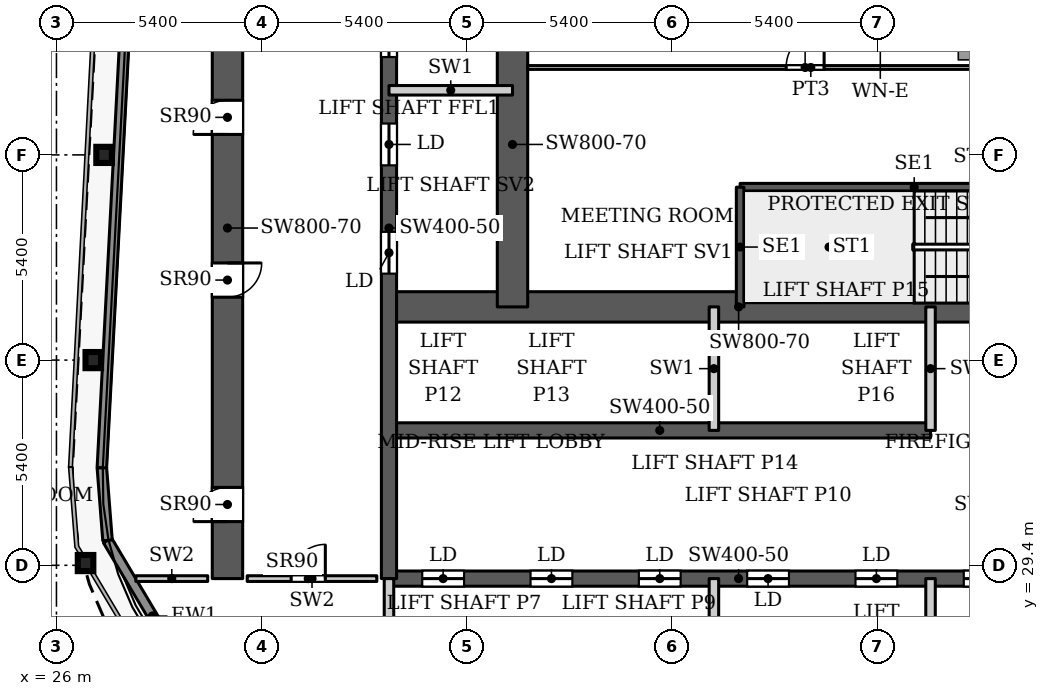
"""IFC4 building model, lengths in metres.
Left out: names, types, materials, properties, quantities, classifications, styles, units other than length and angle.
Written with IfcOpenShell. Run it as: python <this file> out.ifc"""

import sys

from ifc_helpers import new_model, si_unit, direction, frame, frame_2d, origin, origin_2d, place, context, subcontext, project, spatial, rectangle, i_section, extrude, source, transform, mapped, element, fill, save


model = new_model("IFC4")
c1 = context("Model", 3, precision=1e-05, world=origin(), true_north=direction((0.0, 1.0)))
c2 = subcontext(c1, "Body", "Model", "MODEL_VIEW")
j1 = project(units=[si_unit("LENGTHUNIT", "METRE"), si_unit("PLANEANGLEUNIT", "RADIAN")], contexts=[c1])
p1 = place(None, origin())
s1 = spatial("IfcSite", under=j1, at=p1, CompositionType="ELEMENT")
p2 = place(p1, origin())
s2 = spatial("IfcBuilding", under=s1, at=p2, CompositionType="ELEMENT")
p3 = place(p2, frame((0.0, 0.0, 172.1)))
s3 = spatial("IfcBuildingStorey", under=s2, at=p3, CompositionType="ELEMENT", Elevation=172.1)
for number, where, z_axis, x_axis in (
    (1, (26.766, 29.459, 0.0), (0.0, 0.0, 1.0), (1.0, 0.0, 0.0)),
    (2, (26.969, 34.8, 0.0), (0.0, 0.0, 1.0), (1.0, 0.0, 0.0)),
    (3, (27.253, 40.2, 0.0), (0.0, 0.0, 1.0), (1.0, 0.0, 0.0)),
):
    element("IfcColumn", number, at=place(p3, frame(where, z_axis=z_axis, x_axis=x_axis)), inside=s3, PredefinedType="COLUMN", context=c2, shape_type="SweptSolid", body=[
        extrude(i_section(OverallWidth=0.409, OverallDepth=0.425, WebThickness=0.033, FlangeThickness=0.052, FilletRadius=0.013, at=origin_2d()), origin(), (0.0, 0.0, 1.0), 3.9),
    ])
p4 = place(p3, frame((34.75, 29.05, 0.0), z_axis=(0.0, 0.0, 1.0), x_axis=(1.0, 0.0, 0.0)))
e4 = element("IfcWall", 4, at=p4, inside=s3, PredefinedType="SHEAR", context=c2, shape_type="SweptSolid", body=[
    extrude(rectangle(XDim=18.4, YDim=0.4, at=frame_2d((9.2, 0.0))), origin(), (0.0, 0.0, 1.0), 3.9),
])
p5 = place(p4, frame((0.875, 0.0, 0.0)))
e5 = element("IfcOpeningElement", 5, at=p5, cuts=e4, PredefinedType="OPENING", context=c2, shape_type="SweptSolid", body=[
    extrude(rectangle(XDim=1.1, YDim=2.2, at=frame_2d((0.55, 1.1))), frame((0.0, 0.21, 0.0), z_axis=(0.0, -1.0, 0.0), x_axis=(1.0, 0.0, 0.0)), (0.0, 0.0, 1.0), 0.42),
])
p6 = place(p4, frame((3.725, 0.0, 0.0)))
e6 = element("IfcOpeningElement", 6, at=p6, cuts=e4, PredefinedType="OPENING", context=c2, shape_type="SweptSolid", body=[
    extrude(rectangle(XDim=1.1, YDim=2.2, at=frame_2d((0.55, 1.1))), frame((0.0, 0.21, 0.0), z_axis=(0.0, -1.0, 0.0), x_axis=(1.0, 0.0, 0.0)), (0.0, 0.0, 1.0), 0.42),
])
p7 = place(p4, frame((6.575, 0.0, 0.0)))
e7 = element("IfcOpeningElement", 7, at=p7, cuts=e4, PredefinedType="OPENING", context=c2, shape_type="SweptSolid", body=[
    extrude(rectangle(XDim=1.1, YDim=2.2, at=frame_2d((0.55, 1.1))), frame((0.0, 0.21, 0.0), z_axis=(0.0, -1.0, 0.0), x_axis=(1.0, 0.0, 0.0)), (0.0, 0.0, 1.0), 0.42),
])
p8 = place(p4, frame((9.425, 0.0, 0.0)))
e8 = element("IfcOpeningElement", 8, at=p8, cuts=e4, PredefinedType="OPENING", context=c2, shape_type="SweptSolid", body=[
    extrude(rectangle(XDim=1.1, YDim=2.2, at=frame_2d((0.55, 1.1))), frame((0.0, 0.21, 0.0), z_axis=(0.0, -1.0, 0.0), x_axis=(1.0, 0.0, 0.0)), (0.0, 0.0, 1.0), 0.42),
])
p9 = place(p4, frame((12.275, 0.0, 0.0)))
e9 = element("IfcOpeningElement", 9, at=p9, cuts=e4, PredefinedType="OPENING", context=c2, shape_type="SweptSolid", body=[
    extrude(rectangle(XDim=1.1, YDim=2.2, at=frame_2d((0.55, 1.1))), frame((0.0, 0.21, 0.0), z_axis=(0.0, -1.0, 0.0), x_axis=(1.0, 0.0, 0.0)), (0.0, 0.0, 1.0), 0.42),
])
p10 = place(p4, frame((15.125, 0.0, 0.0)))
e10 = element("IfcOpeningElement", 10, at=p10, cuts=e4, PredefinedType="OPENING", context=c2, shape_type="SweptSolid", body=[
    extrude(rectangle(XDim=1.1, YDim=2.2, at=frame_2d((0.55, 1.1))), frame((0.0, 0.21, 0.0), z_axis=(0.0, -1.0, 0.0), x_axis=(1.0, 0.0, 0.0)), (0.0, 0.0, 1.0), 0.42),
])
p11 = place(p3, frame((34.75, 32.95, 0.0), z_axis=(0.0, 0.0, 1.0), x_axis=(1.0, 0.0, 0.0)))
e11 = element("IfcWall", 11, at=p11, inside=s3, PredefinedType="SHEAR", context=c2, shape_type="SweptSolid", body=[
    extrude(rectangle(XDim=14.25, YDim=0.4, at=frame_2d((7.125, 0.0))), origin(), (0.0, 0.0, 1.0), 3.9),
])
p12 = place(p3, frame((34.75, 36.2, 0.0), z_axis=(0.0, 0.0, 1.0), x_axis=(1.0, 0.0, 0.0)))
e12 = element("IfcWall", 12, at=p12, inside=s3, PredefinedType="SHEAR", context=c2, shape_type="SweptSolid", body=[
    extrude(rectangle(XDim=18.4, YDim=0.8, at=frame_2d((9.2, 0.0))), origin(), (0.0, 0.0, 1.0), 3.9),
])
p13 = place(p12, frame((16.9, 0.0, 0.0)))
e13 = element("IfcOpeningElement", 13, at=p13, cuts=e12, PredefinedType="OPENING", context=c2, shape_type="SweptSolid", body=[
    extrude(rectangle(XDim=1.0, YDim=2.2, at=frame_2d((0.5, 1.1))), frame((0.0, 0.41, 0.0), z_axis=(0.0, -1.0, 0.0), x_axis=(1.0, 0.0, 0.0)), (0.0, 0.0, 1.0), 0.82),
])
p14 = place(p3, frame((34.75, 29.05, 0.0), z_axis=(0.0, 0.0, 1.0), x_axis=(0.0, 1.0, 0.0)))
e14 = element("IfcWall", 14, at=p14, inside=s3, PredefinedType="SHEAR", context=c2, shape_type="SweptSolid", body=[
    extrude(rectangle(XDim=18.45, YDim=0.4, at=frame_2d((9.225, 0.0))), origin(), (0.0, 0.0, 1.0), 3.9),
])
p15 = place(p14, frame((8.025, 0.0, 0.0)))
e15 = element("IfcOpeningElement", 15, at=p15, cuts=e14, PredefinedType="OPENING", context=c2, shape_type="SweptSolid", body=[
    extrude(rectangle(XDim=1.1, YDim=2.2, at=frame_2d((0.55, 1.1))), frame((0.0, 0.21, 0.0), z_axis=(0.0, -1.0, 0.0), x_axis=(1.0, 0.0, 0.0)), (0.0, 0.0, 1.0), 0.42),
])
p16 = place(p14, frame((10.875, 0.0, 0.0)))
e16 = element("IfcOpeningElement", 16, at=p16, cuts=e14, PredefinedType="OPENING", context=c2, shape_type="SweptSolid", body=[
    extrude(rectangle(XDim=1.1, YDim=2.2, at=frame_2d((0.55, 1.1))), frame((0.0, 0.21, 0.0), z_axis=(0.0, -1.0, 0.0), x_axis=(1.0, 0.0, 0.0)), (0.0, 0.0, 1.0), 0.42),
])
p17 = place(p14, frame((13.725, 0.0, 0.0)))
e17 = element("IfcOpeningElement", 17, at=p17, cuts=e14, PredefinedType="OPENING", context=c2, shape_type="SweptSolid", body=[
    extrude(rectangle(XDim=1.1, YDim=2.2, at=frame_2d((0.55, 1.1))), frame((0.0, 0.21, 0.0), z_axis=(0.0, -1.0, 0.0), x_axis=(1.0, 0.0, 0.0)), (0.0, 0.0, 1.0), 0.42),
])
p18 = place(p14, frame((15.95, 0.0, 0.0)))
e18 = element("IfcOpeningElement", 18, at=p18, cuts=e14, PredefinedType="OPENING", context=c2, shape_type="SweptSolid", body=[
    extrude(rectangle(XDim=1.1, YDim=2.2, at=frame_2d((0.55, 1.1))), frame((0.0, 0.21, 0.0), z_axis=(0.0, -1.0, 0.0), x_axis=(1.0, 0.0, 0.0)), (0.0, 0.0, 1.0), 0.42),
])
p19 = place(p3, frame((38.0, 36.2, 0.0), z_axis=(0.0, 0.0, 1.0), x_axis=(0.0, 1.0, 0.0)))
e19 = element("IfcWall", 19, at=p19, inside=s3, PredefinedType="SHEAR", context=c2, shape_type="SweptSolid", body=[
    extrude(rectangle(XDim=8.55, YDim=0.8, at=frame_2d((4.275, 0.0))), origin(), (0.0, 0.0, 1.0), 3.9),
])
p20 = place(p3, frame((30.5, 29.05, 0.0), z_axis=(0.0, 0.0, 1.0), x_axis=(0.0, 1.0, 0.0)))
e20 = element("IfcWall", 20, at=p20, inside=s3, PredefinedType="SHEAR", context=c2, shape_type="SweptSolid", body=[
    extrude(rectangle(XDim=18.45, YDim=0.8, at=frame_2d((9.225, 0.0))), origin(), (0.0, 0.0, 1.0), 3.9),
])
p21 = place(p20, frame((1.5, 0.0, 0.0)))
e21 = element("IfcOpeningElement", 21, at=p21, cuts=e20, PredefinedType="OPENING", context=c2, shape_type="SweptSolid", body=[
    extrude(rectangle(XDim=0.9, YDim=2.2, at=frame_2d((0.45, 1.1))), frame((0.0, 0.41, 0.0), z_axis=(0.0, -1.0, 0.0), x_axis=(1.0, 0.0, 0.0)), (0.0, 0.0, 1.0), 0.82),
])
p22 = place(p20, frame((7.406, 0.0, 0.0)))
e22 = element("IfcOpeningElement", 22, at=p22, cuts=e20, PredefinedType="OPENING", context=c2, shape_type="SweptSolid", body=[
    extrude(rectangle(XDim=0.9, YDim=2.2, at=frame_2d((0.45, 1.1))), frame((0.0, 0.41, 0.0), z_axis=(0.0, -1.0, 0.0), x_axis=(1.0, 0.0, 0.0)), (0.0, 0.0, 1.0), 0.82),
])
p23 = place(p20, frame((11.688, 0.0, 0.0)))
e23 = element("IfcOpeningElement", 23, at=p23, cuts=e20, PredefinedType="OPENING", context=c2, shape_type="SweptSolid", body=[
    extrude(rectangle(XDim=0.9, YDim=2.2, at=frame_2d((0.45, 1.1))), frame((0.0, 0.41, 0.0), z_axis=(0.0, -1.0, 0.0), x_axis=(1.0, 0.0, 0.0)), (0.0, 0.0, 1.0), 0.82),
])
p24 = place(p3, frame((29.712, 26.072, 0.0), z_axis=(0.0, 0.0, 1.0), x_axis=(-0.511028049012, 0.859564036662, 0.0)))
e24 = element("IfcWall", 24, at=p24, inside=s3, PredefinedType="SOLIDWALL", context=c2, shape_type="SweptSolid", body=[
    extrude(rectangle(XDim=4.634, YDim=0.25, at=frame_2d((2.317, 0.0))), origin(), (0.0, 0.0, 1.0), 3.147),
])
p25 = place(p3, frame((27.344, 30.055, 0.0), z_axis=(0.0, 0.0, 1.0), x_axis=(-0.077571675317, 0.99698677784, 0.0)))
e25 = element("IfcWall", 25, at=p25, inside=s3, PredefinedType="SOLIDWALL", context=c2, shape_type="SweptSolid", body=[
    extrude(rectangle(XDim=1.92, YDim=0.25, at=frame_2d((0.96, 0.0))), origin(), (0.0, 0.0, 1.0), 3.75),
])
p26 = place(p3, frame((27.195, 31.969, 0.0), z_axis=(0.0, 0.0, 1.0), x_axis=(0.052554995867, 0.998618031286, 0.0)))
e26 = element("IfcWall", 26, at=p26, inside=s3, PredefinedType="SOLIDWALL", context=c2, shape_type="SweptSolid", body=[
    extrude(rectangle(XDim=66.787, YDim=0.25, at=frame_2d((33.394, 0.0))), origin(), (0.0, 0.0, 1.0), 3.75),
])
p27 = place(p3, frame((43.99, 39.35, 0.0), z_axis=(0.0, 0.0, 1.0), x_axis=(1.0, 0.0, 0.0)))
e27 = element("IfcWall", 27, at=p27, inside=s3, PredefinedType="SHEAR", context=c2, shape_type="SweptSolid", body=[
    extrude(rectangle(XDim=9.16, YDim=0.2, at=frame_2d((4.58, 0.0))), origin(), (0.0, 0.0, 1.0), 3.9),
])
p28 = place(p3, frame((43.99, 36.2, 0.0), z_axis=(0.0, 0.0, 1.0), x_axis=(0.0, 1.0, 0.0)))
e28 = element("IfcWall", 28, at=p28, inside=s3, PredefinedType="SHEAR", context=c2, shape_type="SweptSolid", body=[
    extrude(rectangle(XDim=3.15, YDim=0.2, at=frame_2d((1.575, 0.0))), origin(), (0.0, 0.0, 1.0), 3.9),
])
for number, where, z_axis, x_axis in (
    (29, (34.75, 25.8, 0.0), (0.0, 0.0, 1.0), (0.0, 1.0, 0.0)),
    (30, (43.3, 25.8, 0.0), (0.0, 0.0, 1.0), (0.0, 1.0, 0.0)),
    (31, (43.3, 32.95, 0.0), (0.0, 0.0, 1.0), (0.0, 1.0, 0.0)),
    (32, (49.0, 25.8, 0.0), (0.0, 0.0, 1.0), (0.0, 1.0, 0.0)),
    (33, (49.0, 32.95, 0.0), (0.0, 0.0, 1.0), (0.0, 1.0, 0.0)),
    (34, (34.75, 41.9, 0.0), (0.0, 0.0, 1.0), (1.0, 0.0, 0.0)),
):
    element("IfcWall", number, at=place(p3, frame(where, z_axis=z_axis, x_axis=x_axis)), inside=s3, PredefinedType="PARTITIONING", context=c2, shape_type="SweptSolid", body=[
        extrude(rectangle(XDim=3.25, YDim=0.25, at=frame_2d((1.625, 0.0))), origin(), (0.0, 0.0, 1.0), 3.9),
    ])
p29 = place(p3, frame((28.089, 29.05, 0.0), z_axis=(0.0, 0.0, 1.0), x_axis=(1.0, 0.0, 0.0)))
e35 = element("IfcWall", 35, at=p29, inside=s3, PredefinedType="PARTITIONING", context=c2, shape_type="SweptSolid", body=[
    extrude(rectangle(XDim=1.891, YDim=0.15, at=frame_2d((0.945, 0.0))), origin(), (0.0, 0.0, 1.0), 3.9),
])
p30 = place(p3, frame((31.02, 29.05, 0.0), z_axis=(0.0, 0.0, 1.0), x_axis=(1.0, 0.0, 0.0)))
e36 = element("IfcWall", 36, at=p30, inside=s3, PredefinedType="PARTITIONING", context=c2, shape_type="SweptSolid", body=[
    extrude(rectangle(XDim=3.41, YDim=0.15, at=frame_2d((1.705, 0.0))), origin(), (0.0, 0.0, 1.0), 3.9),
])
p31 = place(p30, frame((1.155, 0.0, 0.0)))
e37 = element("IfcOpeningElement", 37, at=p31, cuts=e36, PredefinedType="OPENING", context=c2, shape_type="SweptSolid", body=[
    extrude(rectangle(XDim=0.9, YDim=2.2, at=frame_2d((0.45, 1.1))), frame((0.0, 0.085, 0.0), z_axis=(0.0, -1.0, 0.0), x_axis=(1.0, 0.0, 0.0)), (0.0, 0.0, 1.0), 0.17),
])
p32 = place(p3, frame((38.399, 42.5, 0.0), z_axis=(0.0, 0.0, 1.0), x_axis=(1.0, 0.0, 0.0)))
e38 = element("IfcWall", 38, at=p32, inside=s3, PredefinedType="PARTITIONING", context=c2, shape_type="SweptSolid", body=[
    extrude(rectangle(XDim=14.901, YDim=0.1, at=frame_2d((7.451, 0.0))), origin(), (0.0, 0.0, 1.0), 3.6),
])
p33 = place(p32, frame((6.801, 0.0, 0.0)))
e39 = element("IfcOpeningElement", 39, at=p33, cuts=e38, PredefinedType="OPENING", context=c2, shape_type="SweptSolid", body=[
    extrude(rectangle(XDim=1.0, YDim=2.1, at=frame_2d((0.5, 1.05))), frame((0.0, 0.06, 0.0), z_axis=(0.0, -1.0, 0.0), x_axis=(1.0, 0.0, 0.0)), (0.0, 0.0, 1.0), 0.12),
])
m1 = source(origin(), c2, "Body", "SweptSolid", [
    extrude(rectangle(XDim=1.1, YDim=2.2, at=frame_2d((0.55, 1.1))), frame((0.0, 0.025, 0.0), z_axis=(0.0, -1.0, 0.0), x_axis=(1.0, 0.0, 0.0)), (0.0, 0.0, 1.0), 0.05),
])
p34 = place(p5, origin())
e40 = element("IfcDoor", 40, at=p34, inside=s3, OperationType="SLIDING_TO_LEFT", PredefinedType="DOOR", context=c2, shape_type="MappedRepresentation", body=[
    mapped(m1, transform((0.0, 0.0, 0.0), x_axis=(1.0, 0.0, 0.0), y_axis=(0.0, 1.0, 0.0), z_axis=(0.0, 0.0, 1.0), scale=1.0)),
])
fill(e5, e40)
p35 = place(p6, origin())
e41 = element("IfcDoor", 41, at=p35, inside=s3, OperationType="SLIDING_TO_LEFT", PredefinedType="DOOR", context=c2, shape_type="MappedRepresentation", body=[
    mapped(m1, transform((0.0, 0.0, 0.0), x_axis=(1.0, 0.0, 0.0), y_axis=(0.0, 1.0, 0.0), z_axis=(0.0, 0.0, 1.0), scale=1.0)),
])
fill(e6, e41)
p36 = place(p7, origin())
e42 = element("IfcDoor", 42, at=p36, inside=s3, OperationType="SLIDING_TO_LEFT", PredefinedType="DOOR", context=c2, shape_type="MappedRepresentation", body=[
    mapped(m1, transform((0.0, 0.0, 0.0), x_axis=(1.0, 0.0, 0.0), y_axis=(0.0, 1.0, 0.0), z_axis=(0.0, 0.0, 1.0), scale=1.0)),
])
fill(e7, e42)
p37 = place(p8, origin())
e43 = element("IfcDoor", 43, at=p37, inside=s3, OperationType="SLIDING_TO_LEFT", PredefinedType="DOOR", context=c2, shape_type="MappedRepresentation", body=[
    mapped(m1, transform((0.0, 0.0, 0.0), x_axis=(1.0, 0.0, 0.0), y_axis=(0.0, 1.0, 0.0), z_axis=(0.0, 0.0, 1.0), scale=1.0)),
])
fill(e8, e43)
p38 = place(p9, origin())
e44 = element("IfcDoor", 44, at=p38, inside=s3, OperationType="SLIDING_TO_LEFT", PredefinedType="DOOR", context=c2, shape_type="MappedRepresentation", body=[
    mapped(m1, transform((0.0, 0.0, 0.0), x_axis=(1.0, 0.0, 0.0), y_axis=(0.0, 1.0, 0.0), z_axis=(0.0, 0.0, 1.0), scale=1.0)),
])
fill(e9, e44)
p39 = place(p15, origin())
e45 = element("IfcDoor", 45, at=p39, inside=s3, OperationType="SLIDING_TO_LEFT", PredefinedType="DOOR", context=c2, shape_type="MappedRepresentation", body=[
    mapped(m1, transform((0.0, 0.0, 0.0), x_axis=(1.0, 0.0, 0.0), y_axis=(0.0, 1.0, 0.0), z_axis=(0.0, 0.0, 1.0), scale=1.0)),
])
fill(e15, e45)
p40 = place(p16, origin())
e46 = element("IfcDoor", 46, at=p40, inside=s3, OperationType="SLIDING_TO_LEFT", PredefinedType="DOOR", context=c2, shape_type="MappedRepresentation", body=[
    mapped(m1, transform((0.0, 0.0, 0.0), x_axis=(1.0, 0.0, 0.0), y_axis=(0.0, 1.0, 0.0), z_axis=(0.0, 0.0, 1.0), scale=1.0)),
])
fill(e16, e46)
p41 = place(p17, origin())
e47 = element("IfcDoor", 47, at=p41, inside=s3, OperationType="SLIDING_TO_LEFT", PredefinedType="DOOR", context=c2, shape_type="MappedRepresentation", body=[
    mapped(m1, transform((0.0, 0.0, 0.0), x_axis=(1.0, 0.0, 0.0), y_axis=(0.0, 1.0, 0.0), z_axis=(0.0, 0.0, 1.0), scale=1.0)),
])
fill(e17, e47)
p42 = place(p10, origin())
e48 = element("IfcDoor", 48, at=p42, inside=s3, OperationType="SLIDING_TO_LEFT", PredefinedType="DOOR", context=c2, shape_type="MappedRepresentation", body=[
    mapped(m1, transform((0.0, 0.0, 0.0), x_axis=(1.0, 0.0, 0.0), y_axis=(0.0, 1.0, 0.0), z_axis=(0.0, 0.0, 1.0), scale=1.0)),
])
fill(e10, e48)
m2 = source(origin(), c2, "Body", "SweptSolid", [
    extrude(rectangle(XDim=0.9, YDim=2.2, at=frame_2d((0.45, 1.1))), frame((0.0, 0.025, 0.0), z_axis=(0.0, -1.0, 0.0), x_axis=(1.0, 0.0, 0.0)), (0.0, 0.0, 1.0), 0.05),
])
p43 = place(p21, origin())
e49 = element("IfcDoor", 49, at=p43, inside=s3, OperationType="SINGLE_SWING_LEFT", PredefinedType="DOOR", context=c2, shape_type="MappedRepresentation", body=[
    mapped(m2, transform((0.0, 0.0, 0.0), x_axis=(1.0, 0.0, 0.0), y_axis=(0.0, 1.0, 0.0), z_axis=(0.0, 0.0, 1.0), scale=1.0)),
])
fill(e21, e49)
p44 = place(p22, origin())
e50 = element("IfcDoor", 50, at=p44, inside=s3, OperationType="SINGLE_SWING_RIGHT", PredefinedType="DOOR", context=c2, shape_type="MappedRepresentation", body=[
    mapped(m2, transform((0.0, 0.0, 0.0), x_axis=(1.0, 0.0, 0.0), y_axis=(0.0, 1.0, 0.0), z_axis=(0.0, 0.0, 1.0), scale=1.0)),
])
fill(e22, e50)
p45 = place(p23, origin())
e51 = element("IfcDoor", 51, at=p45, inside=s3, OperationType="SINGLE_SWING_LEFT", PredefinedType="DOOR", context=c2, shape_type="MappedRepresentation", body=[
    mapped(m2, transform((0.0, 0.0, 0.0), x_axis=(1.0, 0.0, 0.0), y_axis=(0.0, 1.0, 0.0), z_axis=(0.0, 0.0, 1.0), scale=1.0)),
])
fill(e23, e51)
p46 = place(p31, origin())
e52 = element("IfcDoor", 52, at=p46, inside=s3, OperationType="SINGLE_SWING_LEFT", PredefinedType="DOOR", context=c2, shape_type="MappedRepresentation", body=[
    mapped(m2, transform((0.0, 0.0, 0.0), x_axis=(1.0, 0.0, 0.0), y_axis=(0.0, 1.0, 0.0), z_axis=(0.0, 0.0, 1.0), scale=1.0)),
])
fill(e37, e52)
m3 = source(origin(), c2, "Body", "SweptSolid", [
    extrude(rectangle(XDim=1.0, YDim=2.1, at=frame_2d((0.5, 1.05))), frame((0.0, 0.025, 0.0), z_axis=(0.0, -1.0, 0.0), x_axis=(1.0, 0.0, 0.0)), (0.0, 0.0, 1.0), 0.05),
])
p47 = place(p33, origin())
e53 = element("IfcDoor", 53, at=p47, inside=s3, OperationType="SINGLE_SWING_LEFT", PredefinedType="DOOR", context=c2, shape_type="MappedRepresentation", body=[
    mapped(m3, transform((0.0, 0.0, 0.0), x_axis=(1.0, 0.0, 0.0), y_axis=(0.0, 1.0, 0.0), z_axis=(0.0, 0.0, 1.0), scale=1.0)),
])
fill(e39, e53)
save(model, sys.argv[1])
